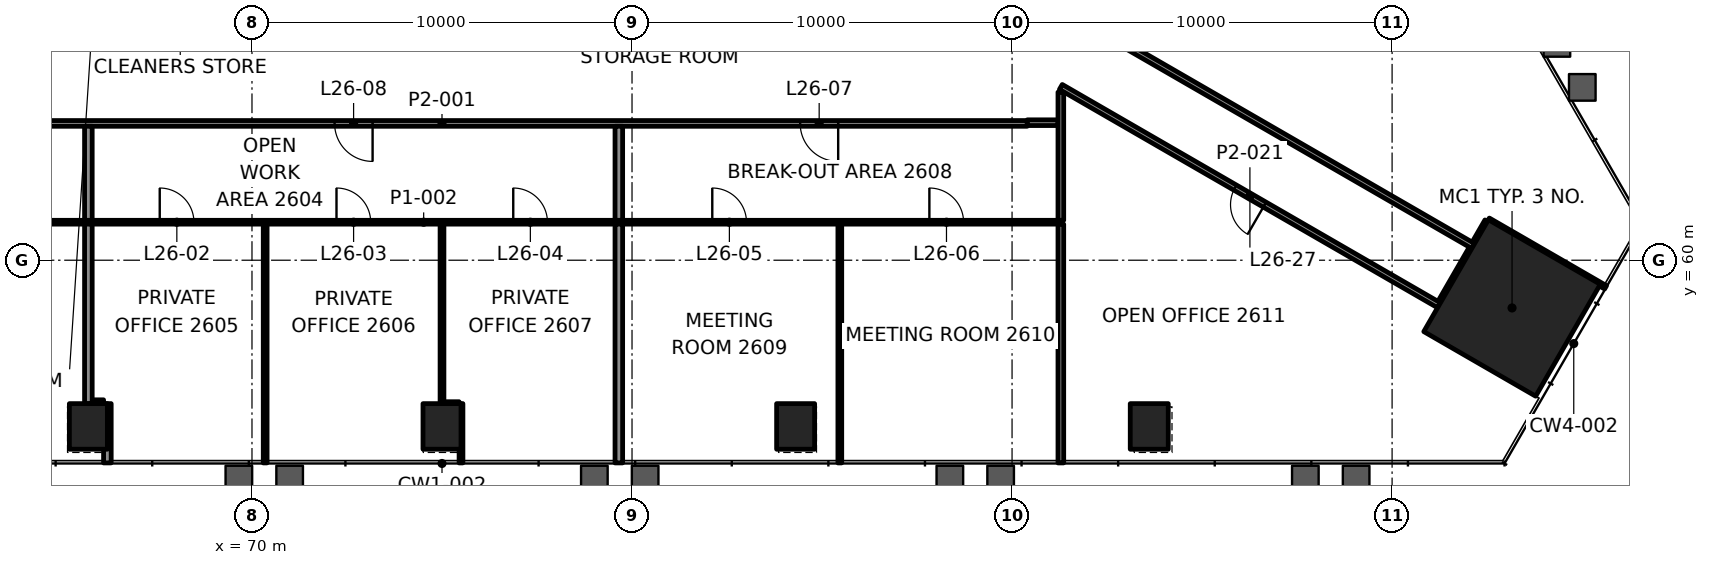
"""IFC4 building model, lengths in metres.
Left out: names, types, materials, properties, quantities, classifications, styles, units other than length and angle.
Written with IfcOpenShell. Run it as: python <this file> out.ifc"""

import sys

from ifc_helpers import new_model, si_unit, direction, frame, frame_2d, origin, origin_2d, place, context, subcontext, project, spatial, rectangle, extrude, element, fill, save


model = new_model("IFC4")
c1 = context("Model", 3, precision=1e-05, world=origin(), true_north=direction((0.0, 1.0)))
c2 = subcontext(c1, "Body", "Model", "MODEL_VIEW")
j1 = project(units=[si_unit("LENGTHUNIT", "METRE"), si_unit("PLANEANGLEUNIT", "RADIAN")], contexts=[c1])
p1 = place(None, origin())
s1 = spatial("IfcSite", under=j1, at=p1, CompositionType="ELEMENT")
p2 = place(p1, origin())
s2 = spatial("IfcBuilding", under=s1, at=p2, CompositionType="ELEMENT")
p3 = place(p2, frame((0.0, 0.0, 115.6)))
s3 = spatial("IfcBuildingStorey", under=s2, at=p3, CompositionType="ELEMENT", Elevation=115.6)
p4 = place(p3, frame((103.156, 58.744, 0.0), z_axis=(0.0, 0.0, 1.0), x_axis=(0.5, 0.866025403784, 0.0)))
e1 = element("IfcColumn", 1, at=p4, inside=s3, PredefinedType="COLUMN", context=c2, shape_type="SweptSolid", body=[
    extrude(rectangle(XDim=3.4, YDim=3.4, at=origin_2d()), origin(), (0.0, 0.0, 1.0), 4.2),
])
for number, where, z_axis, x_axis in (
    (2, (65.695, 55.626, -0.0), (0.0, 0.0, 1.0), (1.0, 0.0, 0.0)),
    (3, (75.0, 55.626, -0.0), (0.0, 0.0, 1.0), (1.0, 0.0, 0.0)),
    (4, (84.305, 55.626, -0.0), (0.0, 0.0, 1.0), (1.0, 0.0, 0.0)),
    (5, (93.61, 55.626, -0.0), (0.0, 0.0, 1.0), (1.0, 0.0, 0.0)),
):
    element("IfcColumn", number, at=place(p3, frame(where, z_axis=z_axis, x_axis=x_axis)), inside=s3, PredefinedType="COLUMN", context=c2, shape_type="SweptSolid", body=[
        extrude(rectangle(XDim=1.0, YDim=1.2, at=origin_2d()), origin(), (0.0, 0.0, 1.0), 4.2),
    ])
p5 = place(p3, frame((65.805, 56.226, 0.0), z_axis=(0.0, 0.0, 1.0), x_axis=(1.0, 0.0, 0.0)))
e6 = element("IfcWall", 6, at=p5, inside=s3, PredefinedType="PARTITIONING", context=c2, shape_type="SweptSolid", body=[
    extrude(rectangle(XDim=0.29, YDim=0.2, at=frame_2d((0.145, 0.0))), origin(), (0.0, 0.0, 1.0), 3.4),
])
p6 = place(p3, frame((75.05, 56.226, 0.0), z_axis=(0.0, 0.0, 1.0), x_axis=(1.0, 0.0, 0.0)))
e7 = element("IfcWall", 7, at=p6, inside=s3, PredefinedType="PARTITIONING", context=c2, shape_type="SweptSolid", body=[
    extrude(rectangle(XDim=0.4, YDim=0.1, at=frame_2d((0.2, 0.0))), origin(), (0.0, 0.0, 1.0), 3.4),
])
p7 = place(p3, frame((57.751, 61.0, 0.0), z_axis=(0.0, 0.0, 1.0), x_axis=(1.0, 0.0, 0.0)))
e8 = element("IfcWall", 8, at=p7, inside=s3, PredefinedType="PARTITIONING", context=c2, shape_type="SweptSolid", body=[
    extrude(rectangle(XDim=33.533, YDim=0.1, at=frame_2d((16.766, 0.0))), origin(), (0.0, 0.0, 1.0), 3.4),
])
p8 = place(p7, frame((3.572, 0.0, 0.0)))
e9 = element("IfcOpeningElement", 9, at=p8, cuts=e8, PredefinedType="OPENING", context=c2, shape_type="SweptSolid", body=[
    extrude(rectangle(XDim=1.0, YDim=2.1, at=frame_2d((0.5, 1.05))), frame((0.0, 0.06, 0.0), z_axis=(0.0, -1.0, 0.0), x_axis=(1.0, 0.0, 0.0)), (0.0, 0.0, 1.0), 0.12),
])
p9 = place(p7, frame((9.822, 0.0, 0.0)))
e10 = element("IfcOpeningElement", 10, at=p9, cuts=e8, PredefinedType="OPENING", context=c2, shape_type="SweptSolid", body=[
    extrude(rectangle(XDim=0.9, YDim=2.1, at=frame_2d((0.45, 1.05))), frame((0.0, 0.06, 0.0), z_axis=(0.0, -1.0, 0.0), x_axis=(1.0, 0.0, 0.0)), (0.0, 0.0, 1.0), 0.12),
])
p10 = place(p7, frame((14.472, 0.0, 0.0)))
e11 = element("IfcOpeningElement", 11, at=p10, cuts=e8, PredefinedType="OPENING", context=c2, shape_type="SweptSolid", body=[
    extrude(rectangle(XDim=0.9, YDim=2.1, at=frame_2d((0.45, 1.05))), frame((0.0, 0.06, 0.0), z_axis=(0.0, -1.0, 0.0), x_axis=(1.0, 0.0, 0.0)), (0.0, 0.0, 1.0), 0.12),
])
p11 = place(p7, frame((19.124, 0.0, 0.0)))
e12 = element("IfcOpeningElement", 12, at=p11, cuts=e8, PredefinedType="OPENING", context=c2, shape_type="SweptSolid", body=[
    extrude(rectangle(XDim=0.9, YDim=2.1, at=frame_2d((0.45, 1.05))), frame((0.0, 0.06, 0.0), z_axis=(0.0, -1.0, 0.0), x_axis=(1.0, 0.0, 0.0)), (0.0, 0.0, 1.0), 0.12),
])
p12 = place(p7, frame((24.361, 0.0, 0.0)))
e13 = element("IfcOpeningElement", 13, at=p12, cuts=e8, PredefinedType="OPENING", context=c2, shape_type="SweptSolid", body=[
    extrude(rectangle(XDim=0.9, YDim=2.1, at=frame_2d((0.45, 1.05))), frame((0.0, 0.06, 0.0), z_axis=(0.0, -1.0, 0.0), x_axis=(1.0, 0.0, 0.0)), (0.0, 0.0, 1.0), 0.12),
])
p13 = place(p7, frame((30.073, 0.0, 0.0)))
e14 = element("IfcOpeningElement", 14, at=p13, cuts=e8, PredefinedType="OPENING", context=c2, shape_type="SweptSolid", body=[
    extrude(rectangle(XDim=0.9, YDim=2.1, at=frame_2d((0.45, 1.05))), frame((0.0, 0.06, 0.0), z_axis=(0.0, -1.0, 0.0), x_axis=(1.0, 0.0, 0.0)), (0.0, 0.0, 1.0), 0.12),
])
p14 = place(p3, frame((90.399, 63.6, 0.0), z_axis=(0.0, 0.0, 1.0), x_axis=(-1.0, 0.0, 0.0)))
e15 = element("IfcWall", 15, at=p14, inside=s3, PredefinedType="PARTITIONING", context=c2, shape_type="SweptSolid", body=[
    extrude(rectangle(XDim=30.799, YDim=0.15, at=frame_2d((15.4, 0.0))), origin(), (0.0, 0.0, 1.0), 3.4),
])
p15 = place(p14, frame((4.975, 0.0, 0.0)))
e16 = element("IfcOpeningElement", 16, at=p15, cuts=e15, PredefinedType="OPENING", context=c2, shape_type="SweptSolid", body=[
    extrude(rectangle(XDim=1.0, YDim=2.1, at=frame_2d((0.5, 1.05))), frame((0.0, 0.085, 0.0), z_axis=(0.0, -1.0, 0.0), x_axis=(1.0, 0.0, 0.0)), (0.0, 0.0, 1.0), 0.17),
])
p16 = place(p14, frame((17.226, 0.0, 0.0)))
e17 = element("IfcOpeningElement", 17, at=p16, cuts=e15, PredefinedType="OPENING", context=c2, shape_type="SweptSolid", body=[
    extrude(rectangle(XDim=1.0, YDim=2.1, at=frame_2d((0.5, 1.05))), frame((0.0, 0.085, 0.0), z_axis=(0.0, -1.0, 0.0), x_axis=(1.0, 0.0, 0.0)), (0.0, 0.0, 1.0), 0.17),
])
p17 = place(p14, frame((27.151, 0.0, 0.0)))
e18 = element("IfcOpeningElement", 18, at=p17, cuts=e15, PredefinedType="OPENING", context=c2, shape_type="SweptSolid", body=[
    extrude(rectangle(XDim=1.0, YDim=2.1, at=frame_2d((0.5, 1.05))), frame((0.0, 0.085, 0.0), z_axis=(0.0, -1.0, 0.0), x_axis=(1.0, 0.0, 0.0)), (0.0, 0.0, 1.0), 0.17),
])
p18 = place(p3, frame((90.4, 63.619, 0.0), z_axis=(0.0, 0.0, 1.0), x_axis=(1.0, 0.0, 0.0)))
e19 = element("IfcWall", 19, at=p18, inside=s3, PredefinedType="PARTITIONING", context=c2, shape_type="SweptSolid", body=[
    extrude(rectangle(XDim=0.809, YDim=0.15, at=frame_2d((0.404, 0.0))), origin(), (0.0, 0.0, 1.0), 3.4),
])
p19 = place(p3, frame((101.272, 58.88, 0.0), z_axis=(0.0, 0.0, 1.0), x_axis=(0.500038426333, 0.866003217194, 0.0)))
e20 = element("IfcWall", 20, at=p19, inside=s3, PredefinedType="PARTITIONING", context=c2, shape_type="SweptSolid", body=[
    extrude(rectangle(XDim=1.65, YDim=0.15, at=frame_2d((0.825, 0.0))), origin(), (0.0, 0.0, 1.0), 3.247),
])
p20 = place(p3, frame((91.284, 54.666, 0.0), z_axis=(0.0, 0.0, 1.0), x_axis=(0.0, 1.0, 0.0)))
e21 = element("IfcWall", 21, at=p20, inside=s3, PredefinedType="PARTITIONING", context=c2, shape_type="SweptSolid", body=[
    extrude(rectangle(XDim=6.284, YDim=0.15, at=frame_2d((3.142, 0.0))), origin(), (0.0, 0.0, 1.0), 3.165),
])
p21 = place(p3, frame((85.468, 54.666, 0.0), z_axis=(0.0, 0.0, 1.0), x_axis=(0.0, 1.0, 0.0)))
e22 = element("IfcWall", 22, at=p21, inside=s3, PredefinedType="PARTITIONING", context=c2, shape_type="SweptSolid", body=[
    extrude(rectangle(XDim=6.284, YDim=0.1, at=frame_2d((3.142, 0.0))), origin(), (0.0, 0.0, 1.0), 3.165),
])
p22 = place(p3, frame((79.653, 54.666, 0.0), z_axis=(0.0, 0.0, 1.0), x_axis=(0.0, 1.0, 0.0)))
e23 = element("IfcWall", 23, at=p22, inside=s3, PredefinedType="PARTITIONING", context=c2, shape_type="SweptSolid", body=[
    extrude(rectangle(XDim=6.284, YDim=0.2, at=frame_2d((3.142, 0.0))), origin(), (0.0, 0.0, 1.0), 3.165),
])
p23 = place(p3, frame((75.5, 54.666, 0.0), z_axis=(0.0, 0.0, 1.0), x_axis=(0.0, 1.0, 0.0)))
e24 = element("IfcWall", 24, at=p23, inside=s3, PredefinedType="PARTITIONING", context=c2, shape_type="SweptSolid", body=[
    extrude(rectangle(XDim=1.56, YDim=0.1, at=frame_2d((0.78, 0.0))), origin(), (0.0, 0.0, 1.0), 3.165),
])
p24 = place(p3, frame((75.0, 56.226, 0.0), z_axis=(0.0, 0.0, 1.0), x_axis=(0.0, 1.0, 0.0)))
e25 = element("IfcWall", 25, at=p24, inside=s3, PredefinedType="PARTITIONING", context=c2, shape_type="SweptSolid", body=[
    extrude(rectangle(XDim=4.724, YDim=0.1, at=frame_2d((2.362, 0.0))), origin(), (0.0, 0.0, 1.0), 3.4),
])
p25 = place(p3, frame((70.347, 54.666, 0.0), z_axis=(0.0, 0.0, 1.0), x_axis=(0.0, 1.0, 0.0)))
e26 = element("IfcWall", 26, at=p25, inside=s3, PredefinedType="PARTITIONING", context=c2, shape_type="SweptSolid", body=[
    extrude(rectangle(XDim=6.284, YDim=0.1, at=frame_2d((3.142, 0.0))), origin(), (0.0, 0.0, 1.0), 3.165),
])
p26 = place(p3, frame((66.195, 54.666, 0.0), z_axis=(0.0, 0.0, 1.0), x_axis=(0.0, 1.0, 0.0)))
e27 = element("IfcWall", 27, at=p26, inside=s3, PredefinedType="PARTITIONING", context=c2, shape_type="SweptSolid", body=[
    extrude(rectangle(XDim=1.56, YDim=0.2, at=frame_2d((0.78, 0.0))), origin(), (0.0, 0.0, 1.0), 3.165),
])
p27 = place(p3, frame((65.695, 56.226, 0.0), z_axis=(0.0, 0.0, 1.0), x_axis=(0.0, 1.0, 0.0)))
e28 = element("IfcWall", 28, at=p27, inside=s3, PredefinedType="PARTITIONING", context=c2, shape_type="SweptSolid", body=[
    extrude(rectangle(XDim=4.724, YDim=0.2, at=frame_2d((2.362, 0.0))), origin(), (0.0, 0.0, 1.0), 3.4),
])
p28 = place(p3, frame((105.617, 59.286, 0.0), z_axis=(0.0, 0.0, 1.0), x_axis=(-0.866043951586, 0.49996787289, 0.0)))
e29 = element("IfcWall", 29, at=p28, inside=s3, PredefinedType="PARTITIONING", context=c2, shape_type="SweptSolid", body=[
    extrude(rectangle(XDim=3.559, YDim=0.1, at=frame_2d((1.78, 0.0))), origin(), (0.0, 0.0, 1.0), 3.4),
])
p29 = place(p3, frame((102.134, 60.374, 0.0), z_axis=(0.0, 0.0, 1.0), x_axis=(-0.86602824724, 0.499995074959, 0.0)))
e30 = element("IfcWall", 30, at=p29, inside=s3, PredefinedType="PARTITIONING", context=c2, shape_type="SweptSolid", body=[
    extrude(rectangle(XDim=13.463, YDim=0.15, at=frame_2d((6.731, 0.0))), origin(), (0.0, 0.0, 1.0), 3.4),
])
p30 = place(p3, frame((101.234, 58.815, 0.0), z_axis=(0.0, 0.0, 1.0), x_axis=(-0.866028466704, 0.49999469483, 0.0)))
e31 = element("IfcWall", 31, at=p30, inside=s3, PredefinedType="PARTITIONING", context=c2, shape_type="SweptSolid", body=[
    extrude(rectangle(XDim=11.489, YDim=0.15, at=frame_2d((5.744, 0.0))), origin(), (0.0, 0.0, 1.0), 3.247),
])
p31 = place(p30, frame((5.294, 0.0, 0.0)))
e32 = element("IfcOpeningElement", 32, at=p31, cuts=e31, PredefinedType="OPENING", context=c2, shape_type="SweptSolid", body=[
    extrude(rectangle(XDim=0.9, YDim=2.1, at=frame_2d((0.45, 1.05))), frame((0.0, 0.085, 0.0), z_axis=(0.0, -1.0, 0.0), x_axis=(1.0, 0.0, 0.0)), (0.0, 0.0, 1.0), 0.17),
])
p32 = place(p3, frame((91.284, 61.05, 0.0), z_axis=(0.0, 0.0, 1.0), x_axis=(0.0, 1.0, 0.0)))
e33 = element("IfcWall", 33, at=p32, inside=s3, PredefinedType="PARTITIONING", context=c2, shape_type="SweptSolid", body=[
    extrude(rectangle(XDim=3.373, YDim=0.15, at=frame_2d((1.686, 0.0))), origin(), (0.0, 0.0, 1.0), 3.247),
])
p33 = place(p3, frame((102.172, 60.438, 0.0), z_axis=(0.0, 0.0, 1.0), x_axis=(0.499994068514, 0.866028828302, 0.0)))
e34 = element("IfcWall", 34, at=p33, inside=s3, PredefinedType="PARTITIONING", context=c2, shape_type="SweptSolid", body=[
    extrude(rectangle(XDim=0.674, YDim=0.15, at=frame_2d((0.337, 0.0))), origin(), (0.0, 0.0, 1.0), 3.4),
])
for number, where, z_axis, x_axis in (
    (35, (79.653, 61.05, 0.0), (0.0, 0.0, 1.0), (0.0, 1.0, 0.0)),
    (36, (65.695, 61.05, 0.0), (0.0, 0.0, 1.0), (0.0, 1.0, 0.0)),
):
    element("IfcWall", number, at=place(p3, frame(where, z_axis=z_axis, x_axis=x_axis)), inside=s3, PredefinedType="PARTITIONING", context=c2, shape_type="SweptSolid", body=[
        extrude(rectangle(XDim=2.475, YDim=0.2, at=frame_2d((1.237, 0.0))), origin(), (0.0, 0.0, 1.0), 3.4),
    ])
p34 = place(p9, origin())
e37 = element("IfcDoor", 37, at=p34, inside=s3, OperationType="SINGLE_SWING_RIGHT", PredefinedType="DOOR", context=c2, shape_type="SweptSolid", body=[
    extrude(rectangle(XDim=0.9, YDim=2.1, at=frame_2d((0.45, 1.05))), frame((0.0, 0.025, 0.0), z_axis=(0.0, -1.0, 0.0), x_axis=(1.0, 0.0, 0.0)), (0.0, 0.0, 1.0), 0.05),
])
fill(e10, e37)
p35 = place(p10, origin())
e38 = element("IfcDoor", 38, at=p35, inside=s3, OperationType="SINGLE_SWING_LEFT", PredefinedType="DOOR", context=c2, shape_type="SweptSolid", body=[
    extrude(rectangle(XDim=0.9, YDim=2.1, at=frame_2d((0.45, 1.05))), frame((0.0, 0.025, 0.0), z_axis=(0.0, -1.0, 0.0), x_axis=(1.0, 0.0, 0.0)), (0.0, 0.0, 1.0), 0.05),
])
fill(e11, e38)
p36 = place(p11, origin())
e39 = element("IfcDoor", 39, at=p36, inside=s3, OperationType="SINGLE_SWING_RIGHT", PredefinedType="DOOR", context=c2, shape_type="SweptSolid", body=[
    extrude(rectangle(XDim=0.9, YDim=2.1, at=frame_2d((0.45, 1.05))), frame((0.0, 0.025, 0.0), z_axis=(0.0, -1.0, 0.0), x_axis=(1.0, 0.0, 0.0)), (0.0, 0.0, 1.0), 0.05),
])
fill(e12, e39)
p37 = place(p12, origin())
e40 = element("IfcDoor", 40, at=p37, inside=s3, OperationType="SINGLE_SWING_RIGHT", PredefinedType="DOOR", context=c2, shape_type="SweptSolid", body=[
    extrude(rectangle(XDim=0.9, YDim=2.1, at=frame_2d((0.45, 1.05))), frame((0.0, 0.025, 0.0), z_axis=(0.0, -1.0, 0.0), x_axis=(1.0, 0.0, 0.0)), (0.0, 0.0, 1.0), 0.05),
])
fill(e13, e40)
p38 = place(p13, origin())
e41 = element("IfcDoor", 41, at=p38, inside=s3, OperationType="SINGLE_SWING_LEFT", PredefinedType="DOOR", context=c2, shape_type="SweptSolid", body=[
    extrude(rectangle(XDim=0.9, YDim=2.1, at=frame_2d((0.45, 1.05))), frame((0.0, 0.025, 0.0), z_axis=(0.0, -1.0, 0.0), x_axis=(1.0, 0.0, 0.0)), (0.0, 0.0, 1.0), 0.05),
])
fill(e14, e41)
p39 = place(p15, origin())
e42 = element("IfcDoor", 42, at=p39, inside=s3, OperationType="SINGLE_SWING_RIGHT", PredefinedType="DOOR", context=c2, shape_type="SweptSolid", body=[
    extrude(rectangle(XDim=1.0, YDim=2.1, at=frame_2d((0.5, 1.05))), frame((0.0, 0.025, 0.0), z_axis=(0.0, -1.0, 0.0), x_axis=(1.0, 0.0, 0.0)), (0.0, 0.0, 1.0), 0.05),
])
fill(e16, e42)
p40 = place(p16, origin())
e43 = element("IfcDoor", 43, at=p40, inside=s3, OperationType="SINGLE_SWING_RIGHT", PredefinedType="DOOR", context=c2, shape_type="SweptSolid", body=[
    extrude(rectangle(XDim=1.0, YDim=2.1, at=frame_2d((0.5, 1.05))), frame((0.0, 0.025, 0.0), z_axis=(0.0, -1.0, 0.0), x_axis=(1.0, 0.0, 0.0)), (0.0, 0.0, 1.0), 0.05),
])
fill(e17, e43)
p41 = place(p31, origin())
e44 = element("IfcDoor", 44, at=p41, inside=s3, OperationType="SINGLE_SWING_RIGHT", PredefinedType="DOOR", context=c2, shape_type="SweptSolid", body=[
    extrude(rectangle(XDim=0.9, YDim=2.1, at=frame_2d((0.45, 1.05))), frame((0.0, 0.025, 0.0), z_axis=(0.0, -1.0, 0.0), x_axis=(1.0, 0.0, 0.0)), (0.0, 0.0, 1.0), 0.05),
])
fill(e32, e44)
save(model, sys.argv[1])
